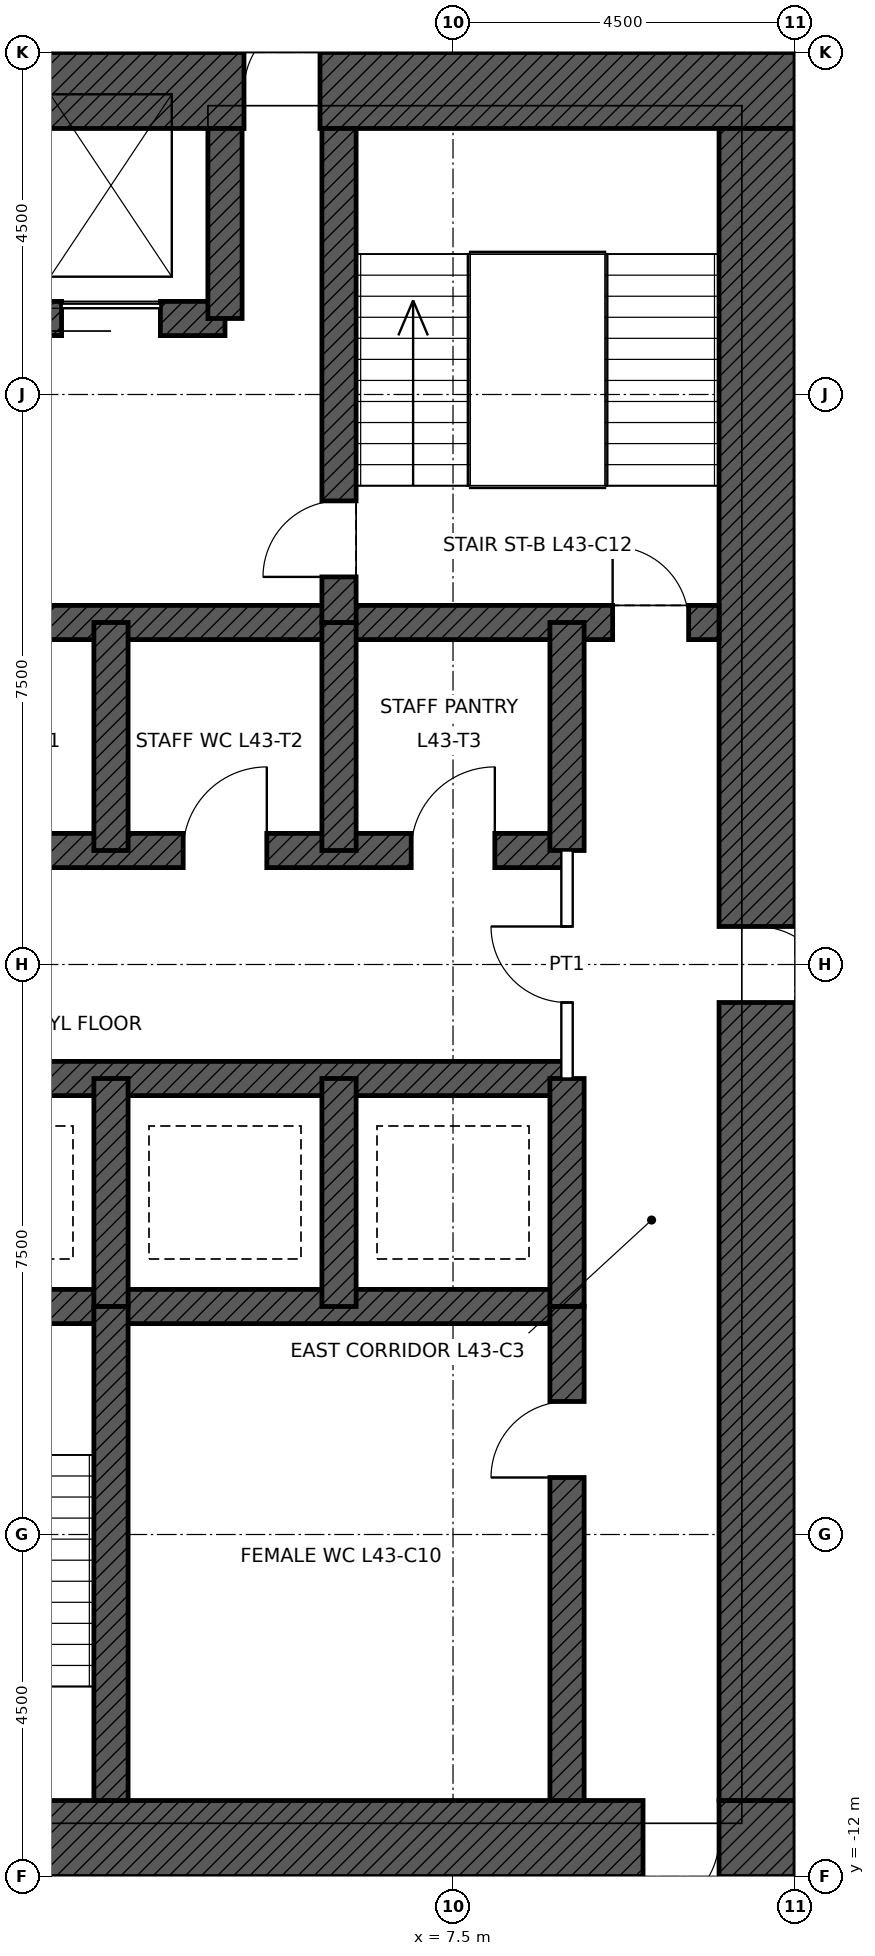
"""IFC4 building model, lengths in metres.
Left out: names, types, materials, properties, quantities, classifications, styles, units other than length and angle.
Written with IfcOpenShell. Run it as: python <this file> out.ifc"""

import sys

from ifc_helpers import new_model, si_unit, direction, frame, frame_2d, origin, place, context, subcontext, project, spatial, rectangle, extrude, element, fill, save


model = new_model("IFC4")
c1 = context("Model", 3, precision=1e-05, world=origin(), true_north=direction((0.0, 1.0)))
c2 = subcontext(c1, "Body", "Model", "MODEL_VIEW")
j1 = project(units=[si_unit("LENGTHUNIT", "METRE"), si_unit("PLANEANGLEUNIT", "RADIAN")], contexts=[c1])
p1 = place(None, origin())
s1 = spatial("IfcSite", under=j1, at=p1, CompositionType="ELEMENT")
p2 = place(p1, origin())
s2 = spatial("IfcBuilding", under=s1, at=p2, CompositionType="ELEMENT")
p3 = place(p2, frame((0.0, 0.0, 205.9)))
s3 = spatial("IfcBuildingStorey", under=s2, at=p3, CompositionType="ELEMENT", Elevation=205.9)
p4 = place(p3, frame((-12.0, 11.5, 0.0), z_axis=(0.0, 0.0, 1.0), x_axis=(1.0, 0.0, 0.0)))
e1 = element("IfcWall", 1, at=p4, inside=s3, PredefinedType="SHEAR", context=c2, shape_type="SweptSolid", body=[
    extrude(rectangle(XDim=24.0, YDim=1.0, at=frame_2d((12.0, 0.0))), origin(), (0.0, 0.0, 1.0), 4.0),
])
p5 = place(p4, frame((6.25, 0.0, 0.0)))
e2 = element("IfcOpeningElement", 2, at=p5, cuts=e1, PredefinedType="OPENING", context=c2, shape_type="SweptSolid", body=[
    extrude(rectangle(XDim=1.0, YDim=2.4, at=frame_2d((0.5, 1.2))), frame((0.0, 0.51, 0.0), z_axis=(0.0, -1.0, 0.0), x_axis=(1.0, 0.0, 0.0)), (0.0, 0.0, 1.0), 1.02),
])
p6 = place(p4, frame((16.75, 0.0, 0.0)))
e3 = element("IfcOpeningElement", 3, at=p6, cuts=e1, PredefinedType="OPENING", context=c2, shape_type="SweptSolid", body=[
    extrude(rectangle(XDim=1.0, YDim=2.4, at=frame_2d((0.5, 1.2))), frame((0.0, 0.51, 0.0), z_axis=(0.0, -1.0, 0.0), x_axis=(1.0, 0.0, 0.0)), (0.0, 0.0, 1.0), 1.02),
])
p7 = place(p3, frame((12.0, -11.5, 0.0), z_axis=(0.0, 0.0, 1.0), x_axis=(-1.0, 0.0, 0.0)))
e4 = element("IfcWall", 4, at=p7, inside=s3, PredefinedType="SHEAR", context=c2, shape_type="SweptSolid", body=[
    extrude(rectangle(XDim=24.0, YDim=1.0, at=frame_2d((12.0, 0.0))), origin(), (0.0, 0.0, 1.0), 4.0),
])
p8 = place(p7, frame((11.5, 0.0, 0.0)))
e5 = element("IfcOpeningElement", 5, at=p8, cuts=e4, PredefinedType="OPENING", context=c2, shape_type="SweptSolid", body=[
    extrude(rectangle(XDim=1.0, YDim=2.1, at=frame_2d((0.5, 1.05))), frame((0.0, 0.51, 0.0), z_axis=(0.0, -1.0, 0.0), x_axis=(1.0, 0.0, 0.0)), (0.0, 0.0, 1.0), 1.02),
])
p9 = place(p7, frame((1.0, 0.0, 0.0)))
e6 = element("IfcOpeningElement", 6, at=p9, cuts=e4, PredefinedType="OPENING", context=c2, shape_type="SweptSolid", body=[
    extrude(rectangle(XDim=1.0, YDim=2.4, at=frame_2d((0.5, 1.2))), frame((0.0, 0.51, 0.0), z_axis=(0.0, -1.0, 0.0), x_axis=(1.0, 0.0, 0.0)), (0.0, 0.0, 1.0), 1.02),
])
p10 = place(p3, frame((11.5, 11.0, 0.0), z_axis=(0.0, 0.0, 1.0), x_axis=(0.0, -1.0, 0.0)))
e7 = element("IfcWall", 7, at=p10, inside=s3, PredefinedType="SHEAR", context=c2, shape_type="SweptSolid", body=[
    extrude(rectangle(XDim=22.0, YDim=1.0, at=frame_2d((11.0, 0.0))), origin(), (0.0, 0.0, 1.0), 4.0),
])
p11 = place(p10, frame((10.5, 0.0, 0.0)))
e8 = element("IfcOpeningElement", 8, at=p11, cuts=e7, PredefinedType="OPENING", context=c2, shape_type="SweptSolid", body=[
    extrude(rectangle(XDim=1.0, YDim=2.4, at=frame_2d((0.5, 1.2))), frame((0.0, 0.51, 0.0), z_axis=(0.0, -1.0, 0.0), x_axis=(1.0, 0.0, 0.0)), (0.0, 0.0, 1.0), 1.02),
])
p12 = place(p3, frame((-11.0, 4.5, 0.0), z_axis=(0.0, 0.0, 1.0), x_axis=(1.0, 0.0, 0.0)))
e9 = element("IfcWall", 9, at=p12, inside=s3, PredefinedType="SHEAR", context=c2, shape_type="SweptSolid", body=[
    extrude(rectangle(XDim=22.0, YDim=0.45, at=frame_2d((11.0, 0.0))), origin(), (0.0, 0.0, 1.0), 4.0),
])
p13 = place(p12, frame((0.4, 0.0, 0.0)))
e10 = element("IfcOpeningElement", 10, at=p13, cuts=e9, PredefinedType="OPENING", context=c2, shape_type="SweptSolid", body=[
    extrude(rectangle(XDim=1.0, YDim=2.1, at=frame_2d((0.5, 1.05))), frame((0.0, 0.235, 0.0), z_axis=(0.0, -1.0, 0.0), x_axis=(1.0, 0.0, 0.0)), (0.0, 0.0, 1.0), 0.47),
])
p14 = place(p12, frame((20.6, 0.0, 0.0)))
e11 = element("IfcOpeningElement", 11, at=p14, cuts=e9, PredefinedType="OPENING", context=c2, shape_type="SweptSolid", body=[
    extrude(rectangle(XDim=1.0, YDim=2.1, at=frame_2d((0.5, 1.05))), frame((0.0, 0.235, 0.0), z_axis=(0.0, -1.0, 0.0), x_axis=(1.0, 0.0, 0.0)), (0.0, 0.0, 1.0), 0.47),
])
p15 = place(p3, frame((-9.0, 1.5, 0.0), z_axis=(0.0, 0.0, 1.0), x_axis=(1.0, 0.0, 0.0)))
e12 = element("IfcWall", 12, at=p15, inside=s3, PredefinedType="SHEAR", context=c2, shape_type="SweptSolid", body=[
    extrude(rectangle(XDim=18.0, YDim=0.45, at=frame_2d((9.0, 0.0))), origin(), (0.0, 0.0, 1.0), 4.0),
])
p16 = place(p15, frame((0.95, 0.0, 0.0)))
e13 = element("IfcOpeningElement", 13, at=p16, cuts=e12, PredefinedType="OPENING", context=c2, shape_type="SweptSolid", body=[
    extrude(rectangle(XDim=1.1, YDim=2.1, at=frame_2d((0.55, 1.05))), frame((0.0, 0.235, 0.0), z_axis=(0.0, -1.0, 0.0), x_axis=(1.0, 0.0, 0.0)), (0.0, 0.0, 1.0), 0.47),
])
p17 = place(p15, frame((3.95, 0.0, 0.0)))
e14 = element("IfcOpeningElement", 14, at=p17, cuts=e12, PredefinedType="OPENING", context=c2, shape_type="SweptSolid", body=[
    extrude(rectangle(XDim=1.1, YDim=2.1, at=frame_2d((0.55, 1.05))), frame((0.0, 0.235, 0.0), z_axis=(0.0, -1.0, 0.0), x_axis=(1.0, 0.0, 0.0)), (0.0, 0.0, 1.0), 0.47),
])
p18 = place(p15, frame((6.95, 0.0, 0.0)))
e15 = element("IfcOpeningElement", 15, at=p18, cuts=e12, PredefinedType="OPENING", context=c2, shape_type="SweptSolid", body=[
    extrude(rectangle(XDim=1.1, YDim=2.1, at=frame_2d((0.55, 1.05))), frame((0.0, 0.235, 0.0), z_axis=(0.0, -1.0, 0.0), x_axis=(1.0, 0.0, 0.0)), (0.0, 0.0, 1.0), 0.47),
])
p19 = place(p15, frame((9.95, 0.0, 0.0)))
e16 = element("IfcOpeningElement", 16, at=p19, cuts=e12, PredefinedType="OPENING", context=c2, shape_type="SweptSolid", body=[
    extrude(rectangle(XDim=1.1, YDim=2.1, at=frame_2d((0.55, 1.05))), frame((0.0, 0.235, 0.0), z_axis=(0.0, -1.0, 0.0), x_axis=(1.0, 0.0, 0.0)), (0.0, 0.0, 1.0), 0.47),
])
p20 = place(p15, frame((12.95, 0.0, 0.0)))
e17 = element("IfcOpeningElement", 17, at=p20, cuts=e12, PredefinedType="OPENING", context=c2, shape_type="SweptSolid", body=[
    extrude(rectangle(XDim=1.1, YDim=2.1, at=frame_2d((0.55, 1.05))), frame((0.0, 0.235, 0.0), z_axis=(0.0, -1.0, 0.0), x_axis=(1.0, 0.0, 0.0)), (0.0, 0.0, 1.0), 0.47),
])
p21 = place(p15, frame((15.95, 0.0, 0.0)))
e18 = element("IfcOpeningElement", 18, at=p21, cuts=e12, PredefinedType="OPENING", context=c2, shape_type="SweptSolid", body=[
    extrude(rectangle(XDim=1.1, YDim=2.1, at=frame_2d((0.55, 1.05))), frame((0.0, 0.235, 0.0), z_axis=(0.0, -1.0, 0.0), x_axis=(1.0, 0.0, 0.0)), (0.0, 0.0, 1.0), 0.47),
])
p22 = place(p3, frame((-9.0, -1.5, 0.0), z_axis=(0.0, 0.0, 1.0), x_axis=(1.0, 0.0, 0.0)))
e19 = element("IfcWall", 19, at=p22, inside=s3, PredefinedType="SHEAR", context=c2, shape_type="SweptSolid", body=[
    extrude(rectangle(XDim=18.0, YDim=0.45, at=frame_2d((9.0, 0.0))), origin(), (0.0, 0.0, 1.0), 4.0),
])
p23 = place(p22, frame((0.95, 0.0, 0.0)))
e20 = element("IfcOpeningElement", 20, at=p23, cuts=e19, PredefinedType="OPENING", context=c2, shape_type="SweptSolid", body=[
    extrude(rectangle(XDim=1.1, YDim=2.1, at=frame_2d((0.55, 1.05))), frame((0.0, 0.235, 0.0), z_axis=(0.0, -1.0, 0.0), x_axis=(1.0, 0.0, 0.0)), (0.0, 0.0, 1.0), 0.47),
])
p24 = place(p22, frame((3.95, 0.0, 0.0)))
e21 = element("IfcOpeningElement", 21, at=p24, cuts=e19, PredefinedType="OPENING", context=c2, shape_type="SweptSolid", body=[
    extrude(rectangle(XDim=1.1, YDim=2.1, at=frame_2d((0.55, 1.05))), frame((0.0, 0.235, 0.0), z_axis=(0.0, -1.0, 0.0), x_axis=(1.0, 0.0, 0.0)), (0.0, 0.0, 1.0), 0.47),
])
p25 = place(p22, frame((6.95, 0.0, 0.0)))
e22 = element("IfcOpeningElement", 22, at=p25, cuts=e19, PredefinedType="OPENING", context=c2, shape_type="SweptSolid", body=[
    extrude(rectangle(XDim=1.1, YDim=2.1, at=frame_2d((0.55, 1.05))), frame((0.0, 0.235, 0.0), z_axis=(0.0, -1.0, 0.0), x_axis=(1.0, 0.0, 0.0)), (0.0, 0.0, 1.0), 0.47),
])
p26 = place(p3, frame((-9.0, -4.5, 0.0), z_axis=(0.0, 0.0, 1.0), x_axis=(1.0, 0.0, 0.0)))
e23 = element("IfcWall", 23, at=p26, inside=s3, PredefinedType="SHEAR", context=c2, shape_type="SweptSolid", body=[
    extrude(rectangle(XDim=18.0, YDim=0.45, at=frame_2d((9.0, 0.0))), origin(), (0.0, 0.0, 1.0), 4.0),
])
p27 = place(p3, frame((-4.5, 8.5, 0.0), z_axis=(0.0, 0.0, 1.0), x_axis=(1.0, 0.0, 0.0)))
e24 = element("IfcWall", 24, at=p27, inside=s3, PredefinedType="SHEAR", context=c2, shape_type="SweptSolid", body=[
    extrude(rectangle(XDim=9.0, YDim=0.45, at=frame_2d((4.5, 0.0))), origin(), (0.0, 0.0, 1.0), 4.0),
])
p28 = place(p27, frame((0.85, 0.0, 0.0)))
e25 = element("IfcOpeningElement", 25, at=p28, cuts=e24, PredefinedType="OPENING", context=c2, shape_type="SweptSolid", body=[
    extrude(rectangle(XDim=1.3, YDim=2.4, at=frame_2d((0.65, 1.2))), frame((0.0, 0.235, 0.0), z_axis=(0.0, -1.0, 0.0), x_axis=(1.0, 0.0, 0.0)), (0.0, 0.0, 1.0), 0.47),
])
p29 = place(p27, frame((6.85, 0.0, 0.0)))
e26 = element("IfcOpeningElement", 26, at=p29, cuts=e24, PredefinedType="OPENING", context=c2, shape_type="SweptSolid", body=[
    extrude(rectangle(XDim=1.3, YDim=2.4, at=frame_2d((0.65, 1.2))), frame((0.0, 0.235, 0.0), z_axis=(0.0, -1.0, 0.0), x_axis=(1.0, 0.0, 0.0)), (0.0, 0.0, 1.0), 0.47),
])
p30 = place(p27, frame((3.85, 0.0, 0.0)))
e27 = element("IfcOpeningElement", 27, at=p30, cuts=e24, PredefinedType="OPENING", context=c2, shape_type="SweptSolid", body=[
    extrude(rectangle(XDim=1.3, YDim=2.4, at=frame_2d((0.65, 1.2))), frame((0.0, 0.235, 0.0), z_axis=(0.0, -1.0, 0.0), x_axis=(1.0, 0.0, 0.0)), (0.0, 0.0, 1.0), 0.47),
])
for number, where, z_axis, x_axis in (
    (28, (9.0, 1.5, 0.0), (0.0, 0.0, 1.0), (0.0, 1.0, 0.0)),
    (29, (9.0, -4.5, 0.0), (0.0, 0.0, 1.0), (0.0, 1.0, 0.0)),
    (30, (3.0, 1.5, 0.0), (0.0, 0.0, 1.0), (0.0, 1.0, 0.0)),
    (31, (6.0, 1.5, 0.0), (0.0, 0.0, 1.0), (0.0, 1.0, 0.0)),
    (32, (3.0, -4.5, 0.0), (0.0, 0.0, 1.0), (0.0, 1.0, 0.0)),
    (33, (6.0, -4.5, 0.0), (0.0, 0.0, 1.0), (0.0, 1.0, 0.0)),
):
    element("IfcWall", number, at=place(p3, frame(where, z_axis=z_axis, x_axis=x_axis)), inside=s3, PredefinedType="SHEAR", context=c2, shape_type="SweptSolid", body=[
        extrude(rectangle(XDim=3.0, YDim=0.45, at=frame_2d((1.5, 0.0))), origin(), (0.0, 0.0, 1.0), 4.0),
    ])
p31 = place(p3, frame((6.0, 4.5, 0.0), z_axis=(0.0, 0.0, 1.0), x_axis=(0.0, 1.0, 0.0)))
e34 = element("IfcWall", 34, at=p31, inside=s3, PredefinedType="SHEAR", context=c2, shape_type="SweptSolid", body=[
    extrude(rectangle(XDim=6.5, YDim=0.45, at=frame_2d((3.25, 0.0))), origin(), (0.0, 0.0, 1.0), 4.0),
])
p32 = place(p31, frame((0.6, 0.0, 0.0)))
e35 = element("IfcOpeningElement", 35, at=p32, cuts=e34, PredefinedType="OPENING", context=c2, shape_type="SweptSolid", body=[
    extrude(rectangle(XDim=1.0, YDim=2.1, at=frame_2d((0.5, 1.05))), frame((0.0, 0.235, 0.0), z_axis=(0.0, -1.0, 0.0), x_axis=(1.0, 0.0, 0.0)), (0.0, 0.0, 1.0), 0.47),
])
p33 = place(p3, frame((4.5, 8.5, 0.0), z_axis=(0.0, 0.0, 1.0), x_axis=(0.0, 1.0, 0.0)))
e36 = element("IfcWall", 36, at=p33, inside=s3, PredefinedType="SHEAR", context=c2, shape_type="SweptSolid", body=[
    extrude(rectangle(XDim=2.5, YDim=0.45, at=frame_2d((1.25, 0.0))), origin(), (0.0, 0.0, 1.0), 4.0),
])
p34 = place(p3, frame((9.0, -11.0, 0.0), z_axis=(0.0, 0.0, 1.0), x_axis=(0.0, 1.0, 0.0)))
e37 = element("IfcWall", 37, at=p34, inside=s3, PredefinedType="SHEAR", context=c2, shape_type="SweptSolid", body=[
    extrude(rectangle(XDim=6.5, YDim=0.45, at=frame_2d((3.25, 0.0))), origin(), (0.0, 0.0, 1.0), 4.0),
])
p35 = place(p34, frame((4.25, 0.0, 0.0)))
e38 = element("IfcOpeningElement", 38, at=p35, cuts=e37, PredefinedType="OPENING", context=c2, shape_type="SweptSolid", body=[
    extrude(rectangle(XDim=1.0, YDim=2.1, at=frame_2d((0.5, 1.05))), frame((0.0, 0.235, 0.0), z_axis=(0.0, -1.0, 0.0), x_axis=(1.0, 0.0, 0.0)), (0.0, 0.0, 1.0), 0.47),
])
p36 = place(p3, frame((3.0, -11.0, 0.0), z_axis=(0.0, 0.0, 1.0), x_axis=(0.0, 1.0, 0.0)))
e39 = element("IfcWall", 39, at=p36, inside=s3, PredefinedType="SHEAR", context=c2, shape_type="SweptSolid", body=[
    extrude(rectangle(XDim=6.5, YDim=0.45, at=frame_2d((3.25, 0.0))), origin(), (0.0, 0.0, 1.0), 4.0),
])
p37 = place(p3, frame((9.0, -1.5, 0.0), z_axis=(0.0, 0.0, 1.0), x_axis=(0.0, 1.0, 0.0)))
e40 = element("IfcWall", 40, at=p37, inside=s3, PredefinedType="PARTITIONING", context=c2, shape_type="SweptSolid", body=[
    extrude(rectangle(XDim=3.0, YDim=0.15, at=frame_2d((1.5, 0.0))), origin(), (0.0, 0.0, 1.0), 3.75),
])
p38 = place(p37, frame((1.0, 0.0, 0.0)))
e41 = element("IfcOpeningElement", 41, at=p38, cuts=e40, PredefinedType="OPENING", context=c2, shape_type="SweptSolid", body=[
    extrude(rectangle(XDim=1.0, YDim=2.4, at=frame_2d((0.5, 1.2))), frame((0.0, 0.085, 0.0), z_axis=(0.0, -1.0, 0.0), x_axis=(1.0, 0.0, 0.0)), (0.0, 0.0, 1.0), 0.17),
])
p39 = place(p14, origin())
e42 = element("IfcDoor", 42, at=p39, inside=s3, OperationType="SINGLE_SWING_LEFT", PredefinedType="DOOR", context=c2, shape_type="SweptSolid", body=[
    extrude(rectangle(XDim=1.0, YDim=2.1, at=frame_2d((0.5, 1.05))), frame((0.0, 0.025, 0.0), z_axis=(0.0, -1.0, 0.0), x_axis=(1.0, 0.0, 0.0)), (0.0, 0.0, 1.0), 0.05),
])
fill(e11, e42)
p40 = place(p32, origin())
e43 = element("IfcDoor", 43, at=p40, inside=s3, OperationType="SINGLE_SWING_LEFT", PredefinedType="DOOR", context=c2, shape_type="SweptSolid", body=[
    extrude(rectangle(XDim=1.0, YDim=2.1, at=frame_2d((0.5, 1.05))), frame((0.0, 0.025, 0.0), z_axis=(0.0, -1.0, 0.0), x_axis=(1.0, 0.0, 0.0)), (0.0, 0.0, 1.0), 0.05),
])
fill(e35, e43)
p41 = place(p6, origin())
e44 = element("IfcDoor", 44, at=p41, inside=s3, OperationType="SINGLE_SWING_RIGHT", PredefinedType="DOOR", context=c2, shape_type="SweptSolid", body=[
    extrude(rectangle(XDim=1.0, YDim=2.4, at=frame_2d((0.5, 1.2))), frame((0.0, 0.485, 0.0), z_axis=(0.0, -1.0, 0.0), x_axis=(1.0, 0.0, 0.0)), (0.0, 0.0, 1.0), 0.05),
])
fill(e3, e44)
p42 = place(p11, origin())
e45 = element("IfcDoor", 45, at=p42, inside=s3, OperationType="SINGLE_SWING_RIGHT", PredefinedType="DOOR", context=c2, shape_type="SweptSolid", body=[
    extrude(rectangle(XDim=1.0, YDim=2.4, at=frame_2d((0.5, 1.2))), frame((0.0, 0.485, 0.0), z_axis=(0.0, -1.0, 0.0), x_axis=(1.0, 0.0, 0.0)), (0.0, 0.0, 1.0), 0.05),
])
fill(e8, e45)
p43 = place(p9, origin())
e46 = element("IfcDoor", 46, at=p43, inside=s3, OperationType="SINGLE_SWING_RIGHT", PredefinedType="DOOR", context=c2, shape_type="SweptSolid", body=[
    extrude(rectangle(XDim=1.0, YDim=2.4, at=frame_2d((0.5, 1.2))), frame((0.0, 0.485, 0.0), z_axis=(0.0, -1.0, 0.0), x_axis=(1.0, 0.0, 0.0)), (0.0, 0.0, 1.0), 0.05),
])
fill(e6, e46)
p44 = place(p35, origin())
e47 = element("IfcDoor", 47, at=p44, inside=s3, OperationType="SINGLE_SWING_LEFT", PredefinedType="DOOR", context=c2, shape_type="SweptSolid", body=[
    extrude(rectangle(XDim=1.0, YDim=2.1, at=frame_2d((0.5, 1.05))), frame((0.0, 0.025, 0.0), z_axis=(0.0, -1.0, 0.0), x_axis=(1.0, 0.0, 0.0)), (0.0, 0.0, 1.0), 0.05),
])
fill(e38, e47)
p45 = place(p29, origin())
e48 = element("IfcDoor", 48, at=p45, inside=s3, OperationType="SLIDING_TO_LEFT", PredefinedType="DOOR", context=c2, shape_type="SweptSolid", body=[
    extrude(rectangle(XDim=1.3, YDim=2.4, at=frame_2d((0.65, 1.2))), frame((0.0, 0.025, 0.0), z_axis=(0.0, -1.0, 0.0), x_axis=(1.0, 0.0, 0.0)), (0.0, 0.0, 1.0), 0.05),
])
fill(e26, e48)
p46 = place(p38, origin())
e49 = element("IfcDoor", 49, at=p46, inside=s3, OperationType="SINGLE_SWING_RIGHT", PredefinedType="DOOR", context=c2, shape_type="SweptSolid", body=[
    extrude(rectangle(XDim=1.0, YDim=2.4, at=frame_2d((0.5, 1.2))), frame((0.0, 0.025, 0.0), z_axis=(0.0, -1.0, 0.0), x_axis=(1.0, 0.0, 0.0)), (0.0, 0.0, 1.0), 0.05),
])
fill(e41, e49)
p47 = place(p20, origin())
e50 = element("IfcDoor", 50, at=p47, inside=s3, OperationType="SINGLE_SWING_RIGHT", PredefinedType="DOOR", context=c2, shape_type="SweptSolid", body=[
    extrude(rectangle(XDim=1.1, YDim=2.1, at=frame_2d((0.55, 1.05))), frame((0.0, 0.025, 0.0), z_axis=(0.0, -1.0, 0.0), x_axis=(1.0, 0.0, 0.0)), (0.0, 0.0, 1.0), 0.05),
])
fill(e17, e50)
p48 = place(p21, origin())
e51 = element("IfcDoor", 51, at=p48, inside=s3, OperationType="SINGLE_SWING_RIGHT", PredefinedType="DOOR", context=c2, shape_type="SweptSolid", body=[
    extrude(rectangle(XDim=1.1, YDim=2.1, at=frame_2d((0.55, 1.05))), frame((0.0, 0.025, 0.0), z_axis=(0.0, -1.0, 0.0), x_axis=(1.0, 0.0, 0.0)), (0.0, 0.0, 1.0), 0.05),
])
fill(e18, e51)
save(model, sys.argv[1])
